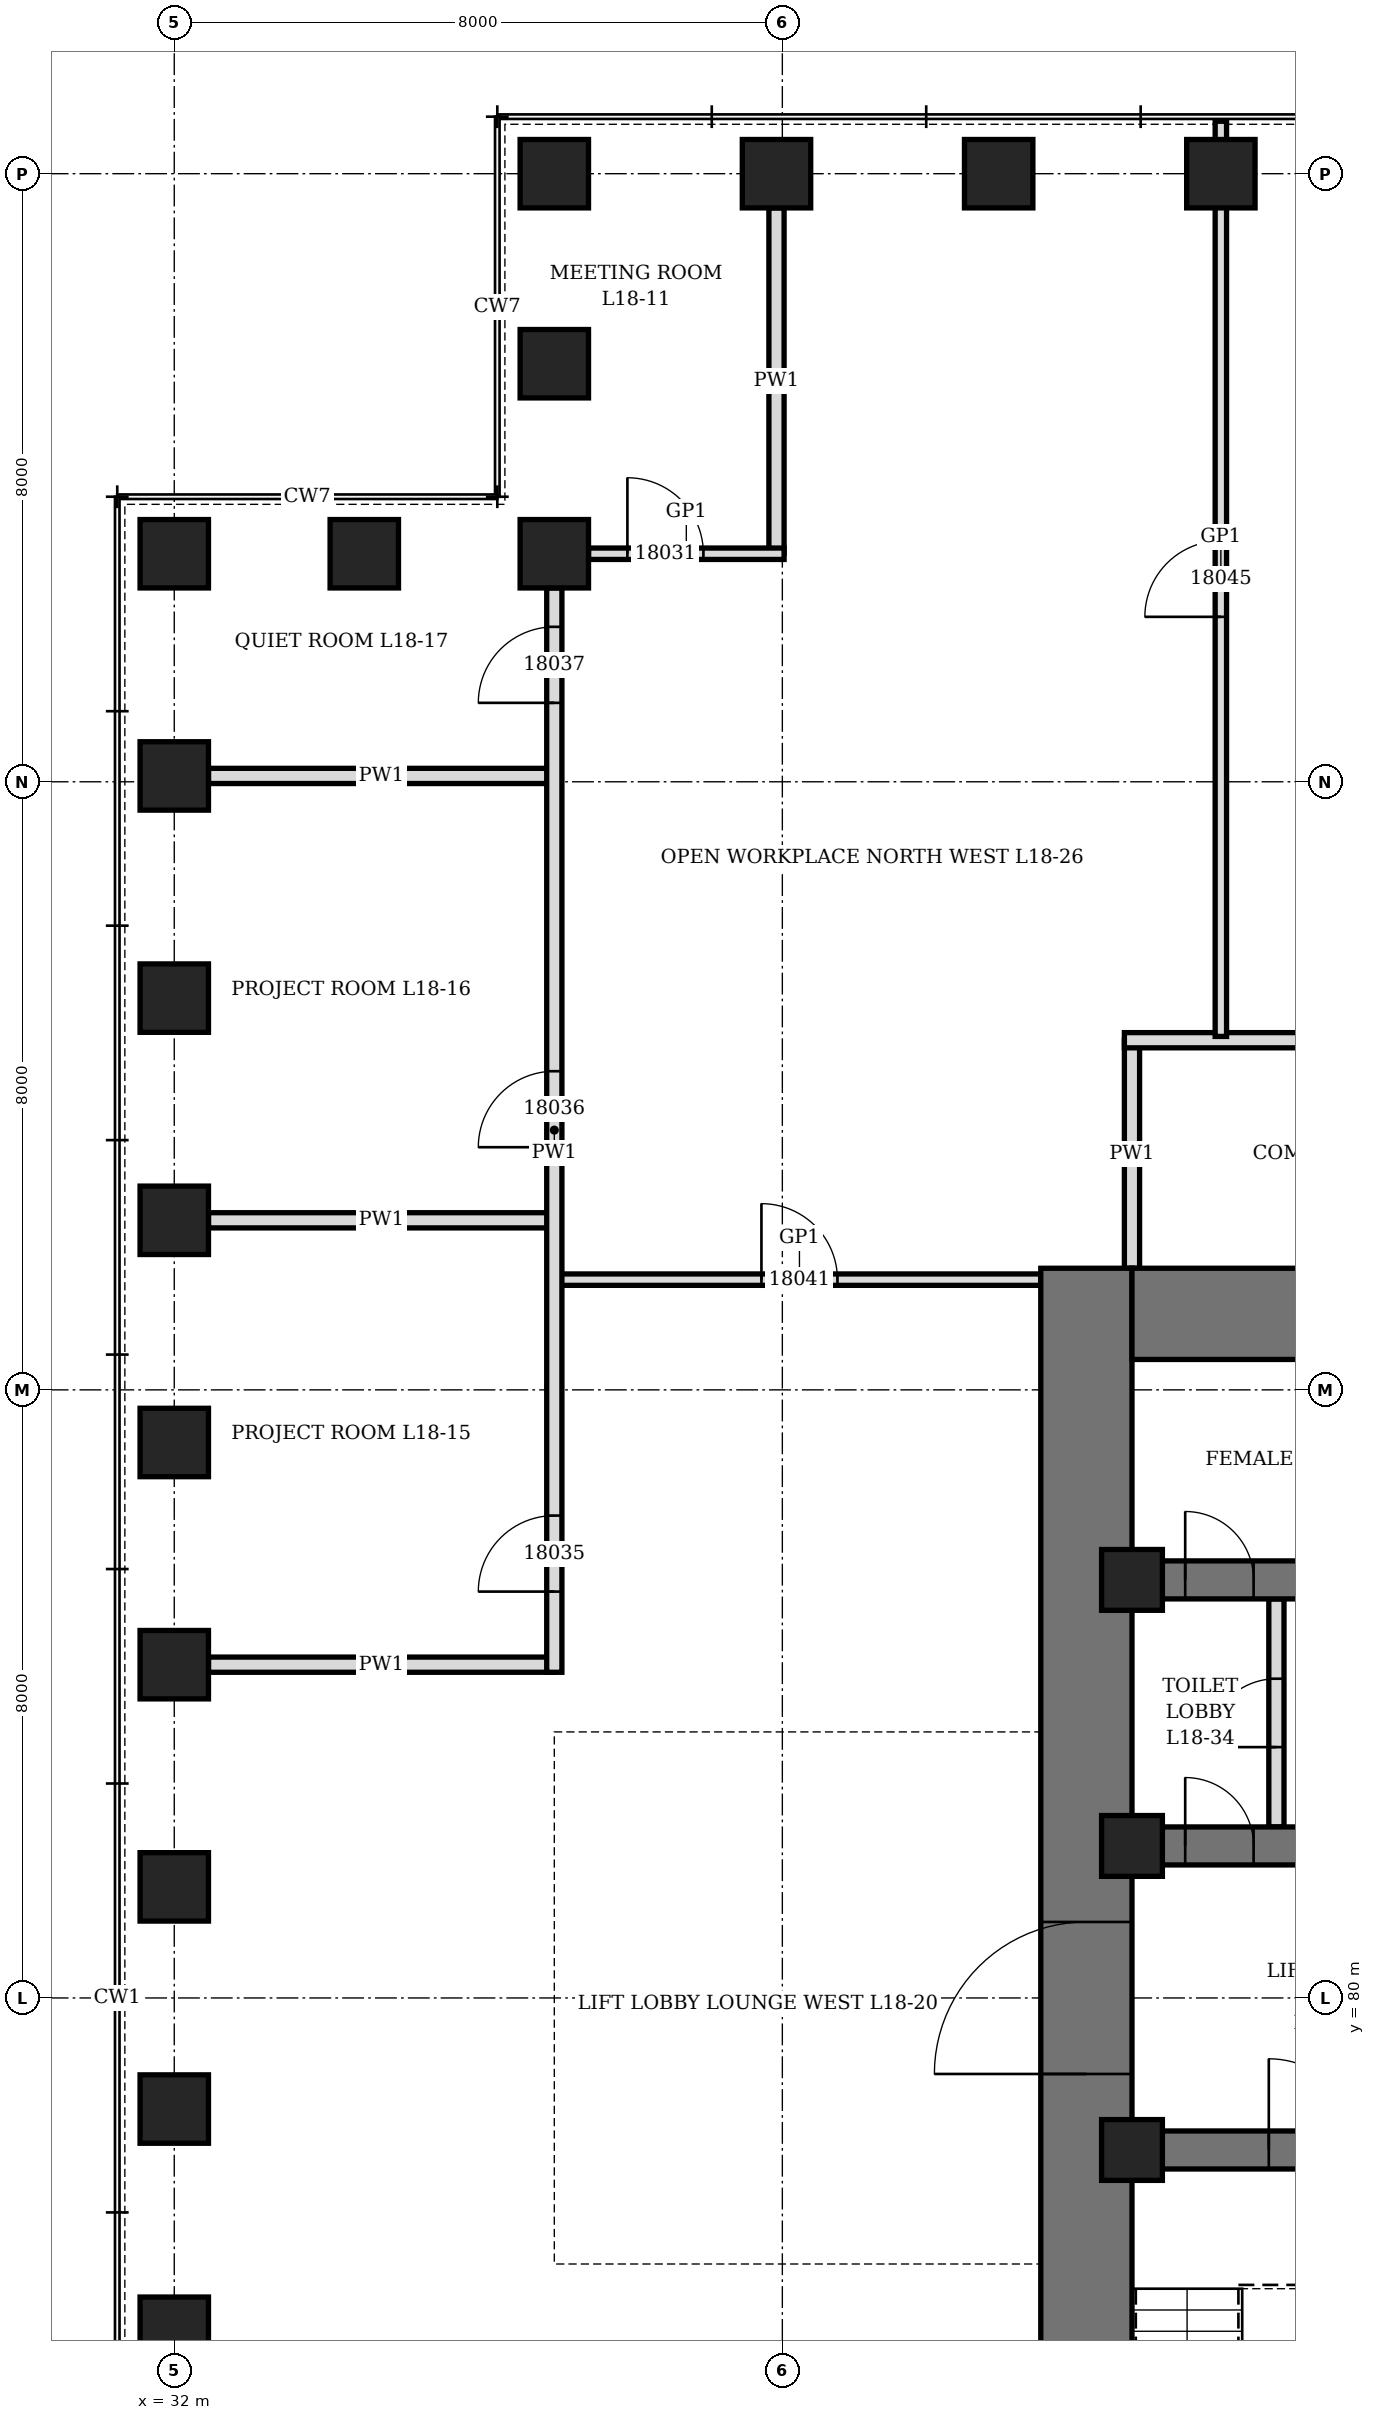
"""IFC4 building model, lengths in metres.
Left out: names, types, materials, properties, quantities, classifications, styles, units other than length and angle.
Written with IfcOpenShell. Run it as: python <this file> out.ifc"""

import sys

from ifc_helpers import new_model, si_unit, direction, frame, frame_2d, origin, origin_2d, place, context, subcontext, project, spatial, rectangle, hollow_rectangle, extrude, element, fill, save


model = new_model("IFC4")
c1 = context("Model", 3, precision=1e-05, world=origin(), true_north=direction((0.0, 1.0)))
c2 = subcontext(c1, "Body", "Model", "MODEL_VIEW")
j1 = project(units=[si_unit("LENGTHUNIT", "METRE"), si_unit("PLANEANGLEUNIT", "RADIAN")], contexts=[c1])
p1 = place(None, origin())
s1 = spatial("IfcSite", under=j1, at=p1, CompositionType="ELEMENT")
p2 = place(p1, origin())
s2 = spatial("IfcBuilding", under=s1, at=p2, CompositionType="ELEMENT")
p3 = place(p2, frame((0.0, 0.0, 85.3)))
s3 = spatial("IfcBuildingStorey", under=s2, at=p3, CompositionType="ELEMENT", Elevation=85.3)
for number, where, z_axis, x_axis in (
    (1, (45.769, 104.0, 0.0), (0.0, 0.0, 1.0), (1.0, 0.0, 0.0)),
    (2, (42.846, 104.0, 0.0), (0.0, 0.0, 1.0), (1.0, 0.0, 0.0)),
    (3, (39.923, 104.0, 0.0), (0.0, 0.0, 1.0), (1.0, 0.0, 0.0)),
    (4, (37.0, 104.0, 0.0), (0.0, 0.0, 1.0), (0.0, 1.0, 0.0)),
    (5, (37.0, 101.5, 0.0), (0.0, 0.0, 1.0), (0.0, 1.0, 0.0)),
    (6, (37.0, 99.0, 0.0), (0.0, 0.0, 1.0), (1.0, 0.0, 0.0)),
    (7, (34.5, 99.0, 0.0), (0.0, 0.0, 1.0), (1.0, 0.0, 0.0)),
    (8, (32.0, 99.0, 0.0), (0.0, 0.0, 1.0), (0.0, 1.0, 0.0)),
    (9, (32.0, 96.077, 0.0), (0.0, 0.0, 1.0), (0.0, 1.0, 0.0)),
    (10, (32.0, 93.154, 0.0), (0.0, 0.0, 1.0), (0.0, 1.0, 0.0)),
    (11, (32.0, 90.231, 0.0), (0.0, 0.0, 1.0), (0.0, 1.0, 0.0)),
    (12, (32.0, 87.308, 0.0), (0.0, 0.0, 1.0), (0.0, 1.0, 0.0)),
    (13, (32.0, 84.385, 0.0), (0.0, 0.0, 1.0), (0.0, 1.0, 0.0)),
    (14, (32.0, 81.461, 0.0), (0.0, 0.0, 1.0), (0.0, 1.0, 0.0)),
    (15, (32.0, 78.539, 0.0), (0.0, 0.0, 1.0), (0.0, 1.0, 0.0)),
    (16, (32.0, 75.615, 0.0), (0.0, 0.0, 1.0), (0.0, 1.0, 0.0)),
):
    element("IfcColumn", number, at=place(p3, frame(where, z_axis=z_axis, x_axis=x_axis)), inside=s3, PredefinedType="COLUMN", context=c2, shape_type="SweptSolid", body=[
        extrude(hollow_rectangle(XDim=0.9, YDim=0.9, WallThickness=0.12, at=origin_2d()), origin(), (0.0, 0.0, 1.0), 4.2),
    ])
p4 = place(p3, frame((44.0, 70.4, 0.0), z_axis=(0.0, 0.0, 1.0), x_axis=(0.0, 1.0, 0.0)))
e17 = element("IfcWall", 17, at=p4, inside=s3, PredefinedType="SHEAR", context=c2, shape_type="SweptSolid", body=[
    extrude(rectangle(XDim=19.2, YDim=1.2, at=frame_2d((9.6, 0.0))), origin(), (0.0, 0.0, 1.0), 4.2),
])
p5 = place(p4, frame((8.6, 0.0, 0.0)))
e18 = element("IfcOpeningElement", 18, at=p5, cuts=e17, PredefinedType="OPENING", context=c2, shape_type="SweptSolid", body=[
    extrude(rectangle(XDim=2.0, YDim=2.4, at=frame_2d((1.0, 1.2))), frame((0.0, 0.61, 0.0), z_axis=(0.0, -1.0, 0.0), x_axis=(1.0, 0.0, 0.0)), (0.0, 0.0, 1.0), 1.22),
])
p6 = place(p3, frame((44.6, 89.0, 0.0), z_axis=(0.0, 0.0, 1.0), x_axis=(1.0, 0.0, 0.0)))
e19 = element("IfcWall", 19, at=p6, inside=s3, PredefinedType="SHEAR", context=c2, shape_type="SweptSolid", body=[
    extrude(rectangle(XDim=22.8, YDim=1.2, at=frame_2d((11.4, 0.0))), origin(), (0.0, 0.0, 1.0), 4.2),
])
p7 = place(p6, frame((7.9, 0.0, 0.0)))
e20 = element("IfcOpeningElement", 20, at=p7, cuts=e19, PredefinedType="OPENING", context=c2, shape_type="SweptSolid", body=[
    extrude(rectangle(XDim=1.0, YDim=2.1, at=frame_2d((0.5, 1.05))), frame((0.0, 0.61, 0.0), z_axis=(0.0, -1.0, 0.0), x_axis=(1.0, 0.0, 0.0)), (0.0, 0.0, 1.0), 1.22),
])
p8 = place(p6, frame((12.05, 0.0, 0.0)))
e21 = element("IfcOpeningElement", 21, at=p8, cuts=e19, PredefinedType="OPENING", context=c2, shape_type="SweptSolid", body=[
    extrude(rectangle(XDim=0.9, YDim=2.1, at=frame_2d((0.45, 1.05))), frame((0.0, 0.61, 0.0), z_axis=(0.0, -1.0, 0.0), x_axis=(1.0, 0.0, 0.0)), (0.0, 0.0, 1.0), 1.22),
])
p9 = place(p6, frame((13.975, 0.0, 0.0)))
e22 = element("IfcOpeningElement", 22, at=p9, cuts=e19, PredefinedType="OPENING", context=c2, shape_type="SweptSolid", body=[
    extrude(rectangle(XDim=0.9, YDim=2.1, at=frame_2d((0.45, 1.05))), frame((0.0, 0.61, 0.0), z_axis=(0.0, -1.0, 0.0), x_axis=(1.0, 0.0, 0.0)), (0.0, 0.0, 1.0), 1.22),
])
p10 = place(p3, frame((44.6, 78.0, 0.0), z_axis=(0.0, 0.0, 1.0), x_axis=(1.0, 0.0, 0.0)))
e23 = element("IfcWall", 23, at=p10, inside=s3, PredefinedType="SHEAR", context=c2, shape_type="SweptSolid", body=[
    extrude(rectangle(XDim=5.15, YDim=0.5, at=frame_2d((2.575, 0.0))), origin(), (0.0, 0.0, 1.0), 4.2),
])
p11 = place(p10, frame((1.8, 0.0, 0.0)))
e24 = element("IfcOpeningElement", 24, at=p11, cuts=e23, PredefinedType="OPENING", context=c2, shape_type="SweptSolid", body=[
    extrude(rectangle(XDim=1.2, YDim=2.1, at=frame_2d((0.6, 1.05))), frame((0.0, 0.26, 0.0), z_axis=(0.0, -1.0, 0.0), x_axis=(1.0, 0.0, 0.0)), (0.0, 0.0, 1.0), 0.52),
])
p12 = place(p3, frame((44.6, 82.0, 0.0), z_axis=(0.0, 0.0, 1.0), x_axis=(1.0, 0.0, 0.0)))
e25 = element("IfcWall", 25, at=p12, inside=s3, PredefinedType="SHEAR", context=c2, shape_type="SweptSolid", body=[
    extrude(rectangle(XDim=5.15, YDim=0.5, at=frame_2d((2.575, 0.0))), origin(), (0.0, 0.0, 1.0), 4.2),
])
p13 = place(p12, frame((0.7, 0.0, 0.0)))
e26 = element("IfcOpeningElement", 26, at=p13, cuts=e25, PredefinedType="OPENING", context=c2, shape_type="SweptSolid", body=[
    extrude(rectangle(XDim=0.9, YDim=2.1, at=frame_2d((0.45, 1.05))), frame((0.0, 0.26, 0.0), z_axis=(0.0, -1.0, 0.0), x_axis=(1.0, 0.0, 0.0)), (0.0, 0.0, 1.0), 0.52),
])
p14 = place(p3, frame((44.6, 85.5, 0.0), z_axis=(0.0, 0.0, 1.0), x_axis=(1.0, 0.0, 0.0)))
e27 = element("IfcWall", 27, at=p14, inside=s3, PredefinedType="SHEAR", context=c2, shape_type="SweptSolid", body=[
    extrude(rectangle(XDim=5.15, YDim=0.5, at=frame_2d((2.575, 0.0))), origin(), (0.0, 0.0, 1.0), 4.2),
])
p15 = place(p14, frame((0.7, 0.0, 0.0)))
e28 = element("IfcOpeningElement", 28, at=p15, cuts=e27, PredefinedType="OPENING", context=c2, shape_type="SweptSolid", body=[
    extrude(rectangle(XDim=0.9, YDim=2.1, at=frame_2d((0.45, 1.05))), frame((0.0, 0.26, 0.0), z_axis=(0.0, -1.0, 0.0), x_axis=(1.0, 0.0, 0.0)), (0.0, 0.0, 1.0), 0.52),
])
for number, where, z_axis, x_axis in (
    (29, (44.6, 78.0, 0.0), (0.0, 0.0, 1.0), (1.0, 0.0, 0.0)),
    (30, (44.6, 82.0, 0.0), (0.0, 0.0, 1.0), (1.0, 0.0, 0.0)),
    (31, (44.6, 85.5, 0.0), (0.0, 0.0, 1.0), (1.0, 0.0, 0.0)),
):
    element("IfcColumn", number, at=place(p3, frame(where, z_axis=z_axis, x_axis=x_axis)), inside=s3, PredefinedType="COLUMN", context=c2, shape_type="SweptSolid", body=[
        extrude(hollow_rectangle(XDim=0.8, YDim=0.8, WallThickness=0.1, at=origin_2d()), origin(), (0.0, 0.0, 1.0), 4.2),
    ])
p16 = place(p3, frame((46.5, 82.25, 0.0), z_axis=(0.0, 0.0, 1.0), x_axis=(0.0, 1.0, 0.0)))
e32 = element("IfcWall", 32, at=p16, inside=s3, PredefinedType="PARTITIONING", context=c2, shape_type="SweptSolid", body=[
    extrude(rectangle(XDim=3.0, YDim=0.2, at=frame_2d((1.5, 0.0))), origin(), (0.0, 0.0, 1.0), 4.04),
])
p17 = place(p16, frame((1.05, 0.0, 0.0)))
e33 = element("IfcOpeningElement", 33, at=p17, cuts=e32, PredefinedType="OPENING", context=c2, shape_type="SweptSolid", body=[
    extrude(rectangle(XDim=0.9, YDim=2.1, at=frame_2d((0.45, 1.05))), frame((0.0, 0.11, 0.0), z_axis=(0.0, -1.0, 0.0), x_axis=(1.0, 0.0, 0.0)), (0.0, 0.0, 1.0), 0.22),
])
for number, where, z_axis, x_axis in (
    (34, (39.923, 99.0, 0.0), (0.0, 0.0, 1.0), (0.0, 1.0, 0.0)),
    (35, (32.45, 84.385, 0.0), (0.0, 0.0, 1.0), (1.0, 0.0, 0.0)),
    (36, (32.45, 90.231, 0.0), (0.0, 0.0, 1.0), (1.0, 0.0, 0.0)),
    (37, (32.45, 96.077, 0.0), (0.0, 0.0, 1.0), (1.0, 0.0, 0.0)),
):
    element("IfcWall", number, at=place(p3, frame(where, z_axis=z_axis, x_axis=x_axis)), inside=s3, PredefinedType="PARTITIONING", context=c2, shape_type="SweptSolid", body=[
        extrude(rectangle(XDim=4.55, YDim=0.2, at=frame_2d((2.275, 0.0))), origin(), (0.0, 0.0, 1.0), 3.428),
    ])
p18 = place(p3, frame((44.6, 89.6, 0.0), z_axis=(0.0, 0.0, 1.0), x_axis=(0.0, 1.0, 0.0)))
e38 = element("IfcWall", 38, at=p18, inside=s3, PredefinedType="PARTITIONING", context=c2, shape_type="SweptSolid", body=[
    extrude(rectangle(XDim=3.0, YDim=0.2, at=frame_2d((1.5, 0.0))), origin(), (0.0, 0.0, 1.0), 4.04),
])
p19 = place(p3, frame((37.05, 89.45, 0.0), z_axis=(0.0, 0.0, 1.0), x_axis=(1.0, 0.0, 0.0)))
e39 = element("IfcWall", 39, at=p19, inside=s3, PredefinedType="PARTITIONING", context=c2, shape_type="SweptSolid", body=[
    extrude(rectangle(XDim=6.35, YDim=0.15, at=frame_2d((3.175, 0.0))), origin(), (0.0, 0.0, 1.0), 4.04),
])
p20 = place(p19, frame((2.675, 0.0, 0.0)))
e40 = element("IfcOpeningElement", 40, at=p20, cuts=e39, PredefinedType="OPENING", context=c2, shape_type="SweptSolid", body=[
    extrude(rectangle(XDim=1.0, YDim=2.4, at=frame_2d((0.5, 1.2))), frame((0.0, 0.085, 0.0), z_axis=(0.0, -1.0, 0.0), x_axis=(1.0, 0.0, 0.0)), (0.0, 0.0, 1.0), 0.17),
])
p21 = place(p3, frame((44.5, 92.6, 0.0), z_axis=(0.0, 0.0, 1.0), x_axis=(1.0, 0.0, 0.0)))
e41 = element("IfcWall", 41, at=p21, inside=s3, PredefinedType="PARTITIONING", context=c2, shape_type="SweptSolid", body=[
    extrude(rectangle(XDim=6.4, YDim=0.2, at=frame_2d((3.2, 0.0))), origin(), (0.0, 0.0, 1.0), 4.04),
])
p22 = place(p21, frame((2.7, 0.0, 0.0)))
e42 = element("IfcOpeningElement", 42, at=p22, cuts=e41, PredefinedType="OPENING", context=c2, shape_type="SweptSolid", body=[
    extrude(rectangle(XDim=1.0, YDim=2.1, at=frame_2d((0.5, 1.05))), frame((0.0, 0.11, 0.0), z_axis=(0.0, -1.0, 0.0), x_axis=(1.0, 0.0, 0.0)), (0.0, 0.0, 1.0), 0.22),
])
p23 = place(p3, frame((37.45, 99.0, 0.0), z_axis=(0.0, 0.0, 1.0), x_axis=(1.0, 0.0, 0.0)))
e43 = element("IfcWall", 43, at=p23, inside=s3, PredefinedType="PARTITIONING", context=c2, shape_type="SweptSolid", body=[
    extrude(rectangle(XDim=2.573, YDim=0.15, at=frame_2d((1.287, 0.0))), origin(), (0.0, 0.0, 1.0), 4.04),
])
p24 = place(p23, frame((0.511, 0.0, 0.0)))
e44 = element("IfcOpeningElement", 44, at=p24, cuts=e43, PredefinedType="OPENING", context=c2, shape_type="SweptSolid", body=[
    extrude(rectangle(XDim=1.0, YDim=2.4, at=frame_2d((0.5, 1.2))), frame((0.0, 0.085, 0.0), z_axis=(0.0, -1.0, 0.0), x_axis=(1.0, 0.0, 0.0)), (0.0, 0.0, 1.0), 0.17),
])
p25 = place(p3, frame((37.0, 84.285, 0.0), z_axis=(0.0, 0.0, 1.0), x_axis=(0.0, 1.0, 0.0)))
e45 = element("IfcWall", 45, at=p25, inside=s3, PredefinedType="PARTITIONING", context=c2, shape_type="SweptSolid", body=[
    extrude(rectangle(XDim=14.265, YDim=0.2, at=frame_2d((7.133, 0.0))), origin(), (0.0, 0.0, 1.0), 4.04),
])
p26 = place(p25, frame((1.062, 0.0, 0.0)))
e46 = element("IfcOpeningElement", 46, at=p26, cuts=e45, PredefinedType="OPENING", context=c2, shape_type="SweptSolid", body=[
    extrude(rectangle(XDim=1.0, YDim=2.1, at=frame_2d((0.5, 1.05))), frame((0.0, 0.11, 0.0), z_axis=(0.0, -1.0, 0.0), x_axis=(1.0, 0.0, 0.0)), (0.0, 0.0, 1.0), 0.22),
])
p27 = place(p25, frame((6.908, 0.0, 0.0)))
e47 = element("IfcOpeningElement", 47, at=p27, cuts=e45, PredefinedType="OPENING", context=c2, shape_type="SweptSolid", body=[
    extrude(rectangle(XDim=1.0, YDim=2.1, at=frame_2d((0.5, 1.05))), frame((0.0, 0.11, 0.0), z_axis=(0.0, -1.0, 0.0), x_axis=(1.0, 0.0, 0.0)), (0.0, 0.0, 1.0), 0.22),
])
p28 = place(p25, frame((12.754, 0.0, 0.0)))
e48 = element("IfcOpeningElement", 48, at=p28, cuts=e45, PredefinedType="OPENING", context=c2, shape_type="SweptSolid", body=[
    extrude(rectangle(XDim=1.0, YDim=2.1, at=frame_2d((0.5, 1.05))), frame((0.0, 0.11, 0.0), z_axis=(0.0, -1.0, 0.0), x_axis=(1.0, 0.0, 0.0)), (0.0, 0.0, 1.0), 0.22),
])
p29 = place(p3, frame((45.769, 92.65, 0.0), z_axis=(0.0, 0.0, 1.0), x_axis=(0.0, 1.0, 0.0)))
e49 = element("IfcWall", 49, at=p29, inside=s3, PredefinedType="PARTITIONING", context=c2, shape_type="SweptSolid", body=[
    extrude(rectangle(XDim=12.04, YDim=0.15, at=frame_2d((6.02, 0.0))), origin(), (0.0, 0.0, 1.0), 3.278),
])
p30 = place(p29, frame((5.52, 0.0, 0.0)))
e50 = element("IfcOpeningElement", 50, at=p30, cuts=e49, PredefinedType="OPENING", context=c2, shape_type="SweptSolid", body=[
    extrude(rectangle(XDim=1.0, YDim=2.4, at=frame_2d((0.5, 1.2))), frame((0.0, 0.085, 0.0), z_axis=(0.0, -1.0, 0.0), x_axis=(1.0, 0.0, 0.0)), (0.0, 0.0, 1.0), 0.17),
])
p31 = place(p13, origin())
e51 = element("IfcDoor", 51, at=p31, inside=s3, OperationType="SINGLE_SWING_LEFT", PredefinedType="DOOR", context=c2, shape_type="SweptSolid", body=[
    extrude(rectangle(XDim=0.9, YDim=2.1, at=frame_2d((0.45, 1.05))), frame((0.0, 0.25, 0.0), z_axis=(0.0, -1.0, 0.0), x_axis=(1.0, 0.0, 0.0)), (0.0, 0.0, 1.0), 0.5),
])
fill(e26, e51)
p32 = place(p17, origin())
e52 = element("IfcDoor", 52, at=p32, inside=s3, OperationType="SINGLE_SWING_RIGHT", PredefinedType="DOOR", context=c2, shape_type="SweptSolid", body=[
    extrude(rectangle(XDim=0.9, YDim=2.1, at=frame_2d((0.45, 1.05))), frame((0.0, 0.1, 0.0), z_axis=(0.0, -1.0, 0.0), x_axis=(1.0, 0.0, 0.0)), (0.0, 0.0, 1.0), 0.199),
])
fill(e33, e52)
p33 = place(p15, origin())
e53 = element("IfcDoor", 53, at=p33, inside=s3, OperationType="SINGLE_SWING_RIGHT", PredefinedType="DOOR", context=c2, shape_type="SweptSolid", body=[
    extrude(rectangle(XDim=0.9, YDim=2.1, at=frame_2d((0.45, 1.05))), frame((0.0, 0.25, 0.0), z_axis=(0.0, -1.0, 0.0), x_axis=(1.0, 0.0, 0.0)), (0.0, 0.0, 1.0), 0.5),
])
fill(e28, e53)
p34 = place(p11, origin())
e54 = element("IfcDoor", 54, at=p34, inside=s3, OperationType="SINGLE_SWING_LEFT", PredefinedType="DOOR", context=c2, shape_type="SweptSolid", body=[
    extrude(rectangle(XDim=1.2, YDim=2.1, at=frame_2d((0.6, 1.05))), frame((0.0, 0.25, 0.0), z_axis=(0.0, -1.0, 0.0), x_axis=(1.0, 0.0, 0.0)), (0.0, 0.0, 1.0), 0.5),
])
fill(e24, e54)
p35 = place(p5, origin())
e55 = element("IfcDoor", 55, at=p35, inside=s3, OperationType="DOUBLE_DOOR_SINGLE_SWING", PredefinedType="DOOR", context=c2, shape_type="SweptSolid", body=[
    extrude(rectangle(XDim=2.0, YDim=2.4, at=frame_2d((1.0, 1.2))), frame((0.0, 0.35, 0.0), z_axis=(0.0, -1.0, 0.0), x_axis=(1.0, 0.0, 0.0)), (0.0, 0.0, 1.0), 0.7),
])
fill(e18, e55)
p36 = place(p24, origin())
e56 = element("IfcDoor", 56, at=p36, inside=s3, OperationType="SINGLE_SWING_RIGHT", PredefinedType="DOOR", context=c2, shape_type="SweptSolid", body=[
    extrude(rectangle(XDim=1.0, YDim=2.4, at=frame_2d((0.5, 1.2))), frame((0.0, 0.075, 0.0), z_axis=(0.0, -1.0, 0.0), x_axis=(1.0, 0.0, 0.0)), (0.0, 0.0, 1.0), 0.149),
])
fill(e44, e56)
p37 = place(p26, origin())
e57 = element("IfcDoor", 57, at=p37, inside=s3, OperationType="SINGLE_SWING_LEFT", PredefinedType="DOOR", context=c2, shape_type="SweptSolid", body=[
    extrude(rectangle(XDim=1.0, YDim=2.1, at=frame_2d((0.5, 1.05))), frame((0.0, 0.1, 0.0), z_axis=(0.0, -1.0, 0.0), x_axis=(1.0, 0.0, 0.0)), (0.0, 0.0, 1.0), 0.199),
])
fill(e46, e57)
p38 = place(p27, origin())
e58 = element("IfcDoor", 58, at=p38, inside=s3, OperationType="SINGLE_SWING_LEFT", PredefinedType="DOOR", context=c2, shape_type="SweptSolid", body=[
    extrude(rectangle(XDim=1.0, YDim=2.1, at=frame_2d((0.5, 1.05))), frame((0.0, 0.1, 0.0), z_axis=(0.0, -1.0, 0.0), x_axis=(1.0, 0.0, 0.0)), (0.0, 0.0, 1.0), 0.199),
])
fill(e47, e58)
p39 = place(p28, origin())
e59 = element("IfcDoor", 59, at=p39, inside=s3, OperationType="SINGLE_SWING_LEFT", PredefinedType="DOOR", context=c2, shape_type="SweptSolid", body=[
    extrude(rectangle(XDim=1.0, YDim=2.1, at=frame_2d((0.5, 1.05))), frame((0.0, 0.1, 0.0), z_axis=(0.0, -1.0, 0.0), x_axis=(1.0, 0.0, 0.0)), (0.0, 0.0, 1.0), 0.199),
])
fill(e48, e59)
p40 = place(p20, origin())
e60 = element("IfcDoor", 60, at=p40, inside=s3, OperationType="SINGLE_SWING_RIGHT", PredefinedType="DOOR", context=c2, shape_type="SweptSolid", body=[
    extrude(rectangle(XDim=1.0, YDim=2.4, at=frame_2d((0.5, 1.2))), frame((0.0, 0.075, 0.0), z_axis=(0.0, -1.0, 0.0), x_axis=(1.0, 0.0, 0.0)), (0.0, 0.0, 1.0), 0.149),
])
fill(e40, e60)
p41 = place(p30, origin())
e61 = element("IfcDoor", 61, at=p41, inside=s3, OperationType="SINGLE_SWING_RIGHT", PredefinedType="DOOR", context=c2, shape_type="SweptSolid", body=[
    extrude(rectangle(XDim=1.0, YDim=2.4, at=frame_2d((0.5, 1.2))), frame((0.0, 0.075, 0.0), z_axis=(0.0, -1.0, 0.0), x_axis=(1.0, 0.0, 0.0)), (0.0, 0.0, 1.0), 0.149),
])
fill(e50, e61)
save(model, sys.argv[1])
